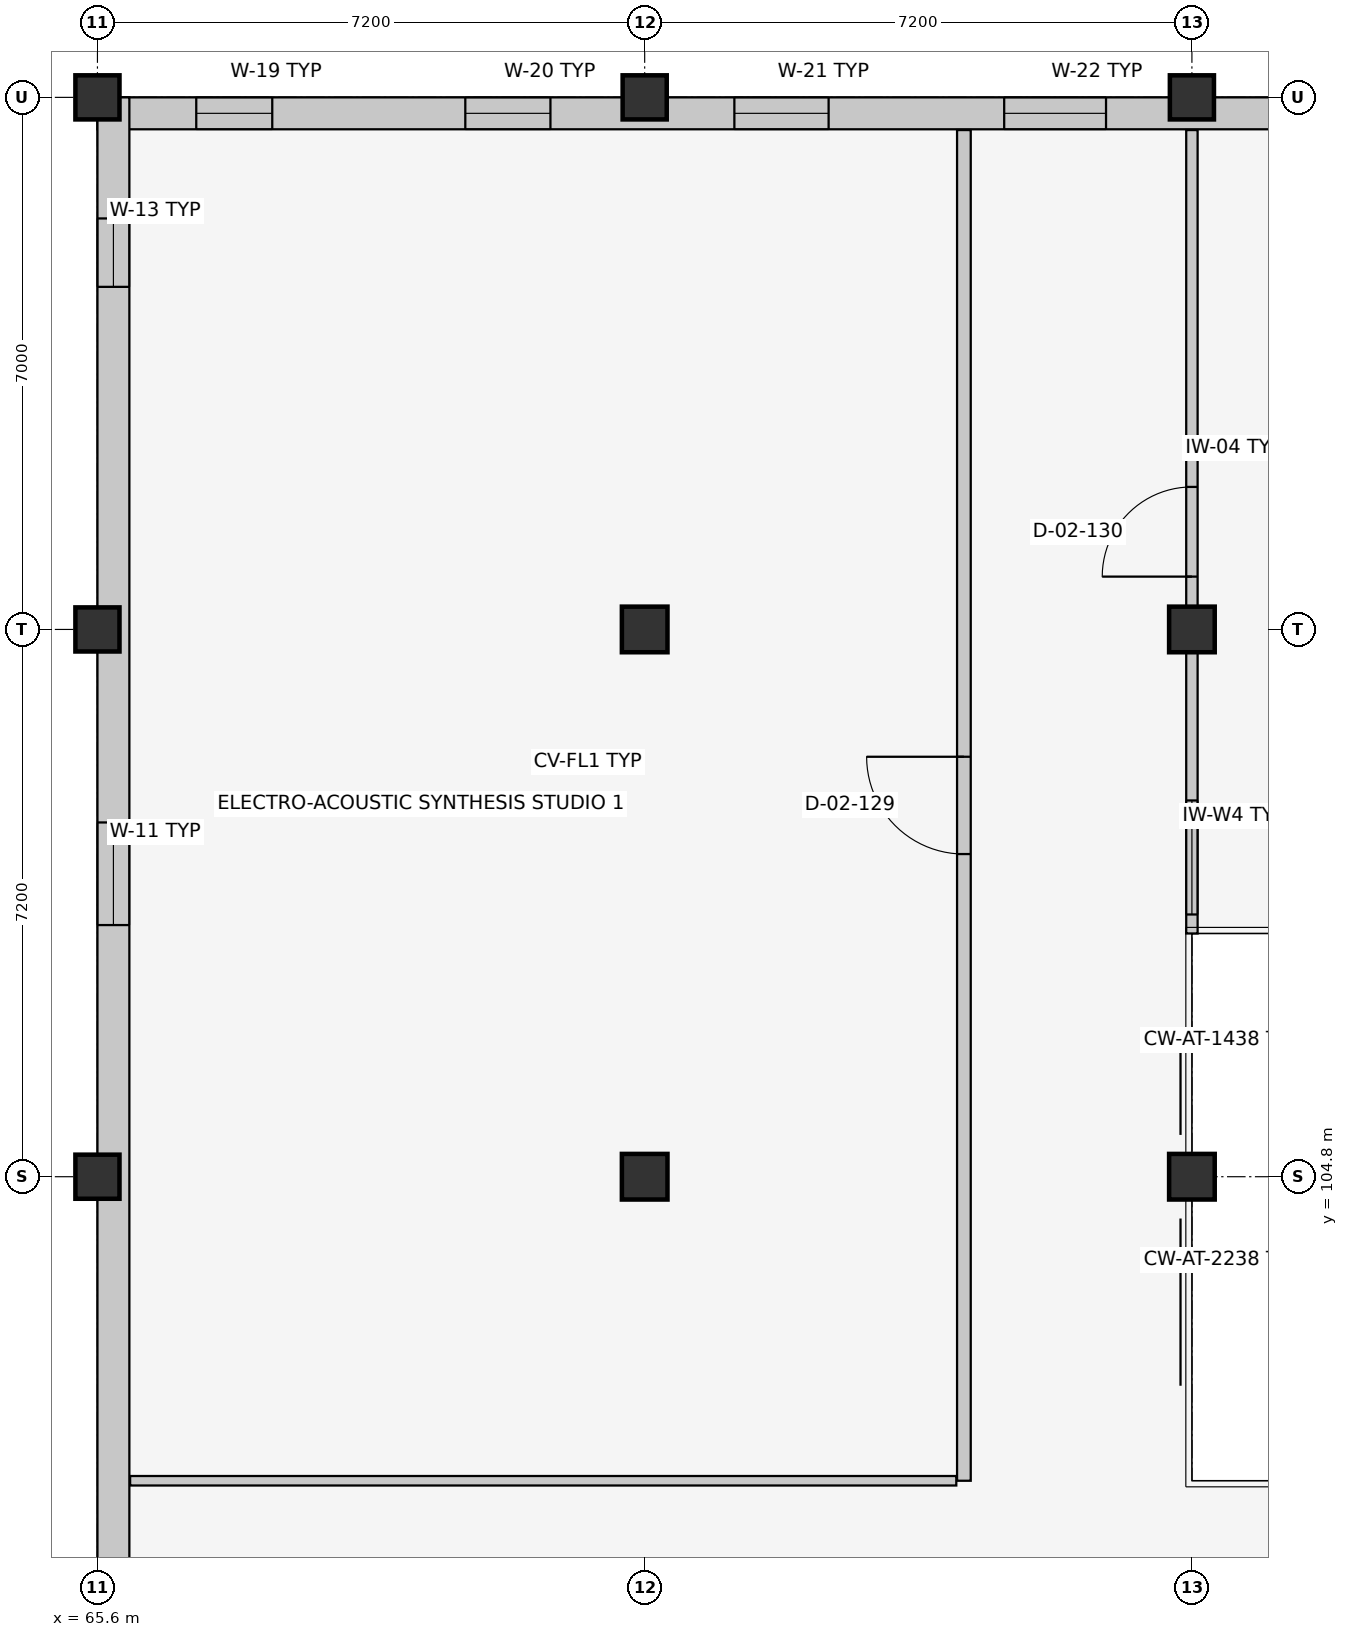
"""IFC4 building model, lengths in metres.
Left out: names, types, materials, properties, quantities, classifications, styles, units other than length and angle.
Written with IfcOpenShell. Run it as: python <this file> out.ifc"""

import sys

from ifc_helpers import new_model, si_unit, direction, frame, frame_2d, origin, origin_2d, place, context, subcontext, project, spatial, rectangle, extrude, element, fill, save


model = new_model("IFC4")
c1 = context("Model", 3, precision=1e-05, world=origin(), true_north=direction((0.0, 1.0)))
c2 = subcontext(c1, "Body", "Model", "MODEL_VIEW")
j1 = project(units=[si_unit("LENGTHUNIT", "METRE"), si_unit("PLANEANGLEUNIT", "RADIAN")], contexts=[c1])
p1 = place(None, origin())
s1 = spatial("IfcSite", under=j1, at=p1, CompositionType="ELEMENT")
p2 = place(p1, origin())
s2 = spatial("IfcBuilding", under=s1, at=p2, CompositionType="ELEMENT")
p3 = place(p2, frame((0.0, 0.0, 9.6)))
s3 = spatial("IfcBuildingStorey", under=s2, at=p3, CompositionType="ELEMENT", Elevation=9.6)
for number, where, z_axis, x_axis in (
    (1, (65.6, 104.8, 0.0), (0.0, 0.0, 1.0), (1.0, 0.0, 0.0)),
    (2, (65.6, 112.0, 0.0), (0.0, 0.0, 1.0), (1.0, 0.0, 0.0)),
    (3, (65.6, 119.0, 0.0), (0.0, 0.0, 1.0), (1.0, 0.0, 0.0)),
):
    element("IfcColumn", number, at=place(p3, frame(where, z_axis=z_axis, x_axis=x_axis)), inside=s3, PredefinedType="COLUMN", context=c2, shape_type="SweptSolid", body=[
        extrude(rectangle(XDim=0.58, YDim=0.58, at=origin_2d()), origin(), (0.0, 0.0, 1.0), 4.2),
    ])
for number, where, z_axis, x_axis in (
    (4, (72.8, 104.8, 0.0), (0.0, 0.0, 1.0), (1.0, 0.0, 0.0)),
    (5, (72.8, 112.0, 0.0), (0.0, 0.0, 1.0), (1.0, 0.0, 0.0)),
):
    element("IfcColumn", number, at=place(p3, frame(where, z_axis=z_axis, x_axis=x_axis)), inside=s3, PredefinedType="COLUMN", context=c2, shape_type="SweptSolid", body=[
        extrude(rectangle(XDim=0.6, YDim=0.6, at=origin_2d()), origin(), (0.0, 0.0, 1.0), 4.2),
    ])
p4 = place(p3, frame((72.8, 119.0, 0.0), z_axis=(0.0, 0.0, 1.0), x_axis=(1.0, 0.0, 0.0)))
e6 = element("IfcColumn", 6, at=p4, inside=s3, PredefinedType="COLUMN", context=c2, shape_type="SweptSolid", body=[
    extrude(rectangle(XDim=0.58, YDim=0.58, at=origin_2d()), origin(), (0.0, 0.0, 1.0), 4.2),
])
for number, where, z_axis, x_axis in (
    (7, (80.0, 104.8, 0.0), (0.0, 0.0, 1.0), (1.0, 0.0, 0.0)),
    (8, (80.0, 112.0, 0.0), (0.0, 0.0, 1.0), (1.0, 0.0, 0.0)),
):
    element("IfcColumn", number, at=place(p3, frame(where, z_axis=z_axis, x_axis=x_axis)), inside=s3, PredefinedType="COLUMN", context=c2, shape_type="SweptSolid", body=[
        extrude(rectangle(XDim=0.6, YDim=0.6, at=origin_2d()), origin(), (0.0, 0.0, 1.0), 4.2),
    ])
p5 = place(p3, frame((80.0, 119.0, 0.0), z_axis=(0.0, 0.0, 1.0), x_axis=(1.0, 0.0, 0.0)))
e9 = element("IfcColumn", 9, at=p5, inside=s3, PredefinedType="COLUMN", context=c2, shape_type="SweptSolid", body=[
    extrude(rectangle(XDim=0.58, YDim=0.58, at=origin_2d()), origin(), (0.0, 0.0, 1.0), 4.2),
])
p6 = place(p3, frame((65.6, 118.79, 0.0), z_axis=(0.0, 0.0, 1.0), x_axis=(1.0, 0.0, 0.0)))
e10 = element("IfcWall", 10, at=p6, inside=s3, PredefinedType="SOLIDWALL", context=c2, shape_type="SweptSolid", body=[
    extrude(rectangle(XDim=43.2, YDim=0.42, at=frame_2d((21.6, 0.0))), origin(), (0.0, 0.0, 1.0), 3.245),
])
p7 = place(p6, frame((1.3, 0.0, 0.9)))
e11 = element("IfcOpeningElement", 11, at=p7, cuts=e10, PredefinedType="OPENING", context=c2, shape_type="SweptSolid", body=[
    extrude(rectangle(XDim=1.0, YDim=1.75, at=frame_2d((0.5, 0.875))), frame((0.0, 0.222, 0.0), z_axis=(0.0, -1.0, 0.0), x_axis=(1.0, 0.0, 0.0)), (0.0, 0.0, 1.0), 0.444),
])
p8 = place(p6, frame((4.84, 0.0, 0.9)))
e12 = element("IfcOpeningElement", 12, at=p8, cuts=e10, PredefinedType="OPENING", context=c2, shape_type="SweptSolid", body=[
    extrude(rectangle(XDim=1.12, YDim=1.75, at=frame_2d((0.56, 0.875))), frame((0.0, 0.222, 0.0), z_axis=(0.0, -1.0, 0.0), x_axis=(1.0, 0.0, 0.0)), (0.0, 0.0, 1.0), 0.444),
])
p9 = place(p6, frame((8.38, 0.0, 0.9)))
e13 = element("IfcOpeningElement", 13, at=p9, cuts=e10, PredefinedType="OPENING", context=c2, shape_type="SweptSolid", body=[
    extrude(rectangle(XDim=1.24, YDim=1.75, at=frame_2d((0.62, 0.875))), frame((0.0, 0.222, 0.0), z_axis=(0.0, -1.0, 0.0), x_axis=(1.0, 0.0, 0.0)), (0.0, 0.0, 1.0), 0.444),
])
p10 = place(p6, frame((11.93, 0.0, 0.9)))
e14 = element("IfcOpeningElement", 14, at=p10, cuts=e10, PredefinedType="OPENING", context=c2, shape_type="SweptSolid", body=[
    extrude(rectangle(XDim=1.34, YDim=1.75, at=frame_2d((0.67, 0.875))), frame((0.0, 0.222, 0.0), z_axis=(0.0, -1.0, 0.0), x_axis=(1.0, 0.0, 0.0)), (0.0, 0.0, 1.0), 0.444),
])
p11 = place(p6, frame((15.48, 0.0, 0.9)))
e15 = element("IfcOpeningElement", 15, at=p11, cuts=e10, PredefinedType="OPENING", context=c2, shape_type="SweptSolid", body=[
    extrude(rectangle(XDim=1.44, YDim=1.75, at=frame_2d((0.72, 0.875))), frame((0.0, 0.222, 0.0), z_axis=(0.0, -1.0, 0.0), x_axis=(1.0, 0.0, 0.0)), (0.0, 0.0, 1.0), 0.444),
])
p12 = place(p6, frame((19.05, 0.0, 0.9)))
e16 = element("IfcOpeningElement", 16, at=p12, cuts=e10, PredefinedType="OPENING", context=c2, shape_type="SweptSolid", body=[
    extrude(rectangle(XDim=1.5, YDim=1.75, at=frame_2d((0.75, 0.875))), frame((0.0, 0.222, 0.0), z_axis=(0.0, -1.0, 0.0), x_axis=(1.0, 0.0, 0.0)), (0.0, 0.0, 1.0), 0.444),
])
p13 = place(p6, frame((22.95, 0.0, 0.9)))
e17 = element("IfcOpeningElement", 17, at=p13, cuts=e10, PredefinedType="OPENING", context=c2, shape_type="SweptSolid", body=[
    extrude(rectangle(XDim=0.9, YDim=1.35, at=frame_2d((0.45, 0.675))), frame((0.0, 0.222, 0.0), z_axis=(0.0, -1.0, 0.0), x_axis=(1.0, 0.0, 0.0)), (0.0, 0.0, 1.0), 0.444),
])
p14 = place(p6, frame((26.5, 0.0, 0.9)))
e18 = element("IfcOpeningElement", 18, at=p14, cuts=e10, PredefinedType="OPENING", context=c2, shape_type="SweptSolid", body=[
    extrude(rectangle(XDim=1.0, YDim=1.35, at=frame_2d((0.5, 0.675))), frame((0.0, 0.222, 0.0), z_axis=(0.0, -1.0, 0.0), x_axis=(1.0, 0.0, 0.0)), (0.0, 0.0, 1.0), 0.444),
])
p15 = place(p6, frame((30.05, 0.0, 0.9)))
e19 = element("IfcOpeningElement", 19, at=p15, cuts=e10, PredefinedType="OPENING", context=c2, shape_type="SweptSolid", body=[
    extrude(rectangle(XDim=1.1, YDim=1.35, at=frame_2d((0.55, 0.675))), frame((0.0, 0.222, 0.0), z_axis=(0.0, -1.0, 0.0), x_axis=(1.0, 0.0, 0.0)), (0.0, 0.0, 1.0), 0.444),
])
p16 = place(p6, frame((33.6, 0.0, 0.9)))
e20 = element("IfcOpeningElement", 20, at=p16, cuts=e10, PredefinedType="OPENING", context=c2, shape_type="SweptSolid", body=[
    extrude(rectangle(XDim=1.2, YDim=1.35, at=frame_2d((0.6, 0.675))), frame((0.0, 0.222, 0.0), z_axis=(0.0, -1.0, 0.0), x_axis=(1.0, 0.0, 0.0)), (0.0, 0.0, 1.0), 0.444),
])
p17 = place(p6, frame((37.15, 0.0, 0.9)))
e21 = element("IfcOpeningElement", 21, at=p17, cuts=e10, PredefinedType="OPENING", context=c2, shape_type="SweptSolid", body=[
    extrude(rectangle(XDim=1.3, YDim=1.35, at=frame_2d((0.65, 0.675))), frame((0.0, 0.222, 0.0), z_axis=(0.0, -1.0, 0.0), x_axis=(1.0, 0.0, 0.0)), (0.0, 0.0, 1.0), 0.444),
])
p18 = place(p6, frame((40.7, 0.0, 0.9)))
e22 = element("IfcOpeningElement", 22, at=p18, cuts=e10, PredefinedType="OPENING", context=c2, shape_type="SweptSolid", body=[
    extrude(rectangle(XDim=1.4, YDim=1.35, at=frame_2d((0.7, 0.675))), frame((0.0, 0.222, 0.0), z_axis=(0.0, -1.0, 0.0), x_axis=(1.0, 0.0, 0.0)), (0.0, 0.0, 1.0), 0.444),
])
p19 = place(p3, frame((65.81, 90.4, 0.0), z_axis=(0.0, 0.0, 1.0), x_axis=(0.0, 1.0, 0.0)))
e23 = element("IfcWall", 23, at=p19, inside=s3, PredefinedType="SOLIDWALL", context=c2, shape_type="SweptSolid", body=[
    extrude(rectangle(XDim=28.6, YDim=0.42, at=frame_2d((14.3, 0.0))), origin(), (0.0, 0.0, 1.0), 3.315),
])
p20 = place(p19, frame((1.568, 0.0, 0.9)))
e24 = element("IfcOpeningElement", 24, at=p20, cuts=e23, PredefinedType="OPENING", context=c2, shape_type="SweptSolid", body=[
    extrude(rectangle(XDim=0.95, YDim=1.45, at=frame_2d((0.475, 0.725))), frame((0.0, 0.222, 0.0), z_axis=(0.0, -1.0, 0.0), x_axis=(1.0, 0.0, 0.0)), (0.0, 0.0, 1.0), 0.444),
])
p21 = place(p19, frame((17.711, 0.0, 0.9)))
e25 = element("IfcOpeningElement", 25, at=p21, cuts=e23, PredefinedType="OPENING", context=c2, shape_type="SweptSolid", body=[
    extrude(rectangle(XDim=1.35, YDim=1.45, at=frame_2d((0.675, 0.725))), frame((0.0, 0.222, 0.0), z_axis=(0.0, -1.0, 0.0), x_axis=(1.0, 0.0, 0.0)), (0.0, 0.0, 1.0), 0.444),
])
p22 = place(p19, frame((26.107, 0.0, 0.9)))
e26 = element("IfcOpeningElement", 26, at=p22, cuts=e23, PredefinedType="OPENING", context=c2, shape_type="SweptSolid", body=[
    extrude(rectangle(XDim=0.9, YDim=1.6, at=frame_2d((0.45, 0.8))), frame((0.0, 0.222, 0.0), z_axis=(0.0, -1.0, 0.0), x_axis=(1.0, 0.0, 0.0)), (0.0, 0.0, 1.0), 0.444),
])
p23 = place(p3, frame((77.0, 100.8, 0.0), z_axis=(0.0, 0.0, 1.0), x_axis=(0.0, 1.0, 0.0)))
e27 = element("IfcWall", 27, at=p23, inside=s3, PredefinedType="PARTITIONING", context=c2, shape_type="SweptSolid", body=[
    extrude(rectangle(XDim=17.77, YDim=0.18, at=frame_2d((8.885, 0.0))), origin(), (0.0, 0.0, 1.0), 3.92),
])
p24 = place(p23, frame((8.245, 0.0, 0.0)))
e28 = element("IfcOpeningElement", 28, at=p24, cuts=e27, PredefinedType="OPENING", context=c2, shape_type="SweptSolid", body=[
    extrude(rectangle(XDim=1.28, YDim=2.2, at=frame_2d((0.64, 1.1))), frame((0.0, 0.102, 0.0), z_axis=(0.0, -1.0, 0.0), x_axis=(1.0, 0.0, 0.0)), (0.0, 0.0, 1.0), 0.204),
])
p25 = place(p3, frame((66.03, 100.8, 0.0), z_axis=(0.0, 0.0, 1.0), x_axis=(1.0, 0.0, 0.0)))
e29 = element("IfcWall", 29, at=p25, inside=s3, PredefinedType="PARTITIONING", context=c2, shape_type="SweptSolid", body=[
    extrude(rectangle(XDim=10.87, YDim=0.125, at=frame_2d((5.435, 0.0))), origin(), (0.0, 0.0, 1.0), 3.92),
])
p26 = place(p3, frame((80.0, 108.0, 0.0), z_axis=(0.0, 0.0, 1.0), x_axis=(0.0, 1.0, 0.0)))
e30 = element("IfcWall", 30, at=p26, inside=s3, PredefinedType="PARTITIONING", context=c2, shape_type="SweptSolid", body=[
    extrude(rectangle(XDim=10.57, YDim=0.15, at=frame_2d((5.285, 0.0))), origin(), (0.0, 0.0, 1.0), 3.295),
])
p27 = place(p26, frame((4.695, 0.0, 0.0)))
e31 = element("IfcOpeningElement", 31, at=p27, cuts=e30, PredefinedType="OPENING", context=c2, shape_type="SweptSolid", body=[
    extrude(rectangle(XDim=1.18, YDim=2.2, at=frame_2d((0.59, 1.1))), frame((0.0, 0.087, 0.0), z_axis=(0.0, -1.0, 0.0), x_axis=(1.0, 0.0, 0.0)), (0.0, 0.0, 1.0), 0.174),
])
p28 = place(p26, frame((0.25, 0.0, 1.0)))
e32 = element("IfcOpeningElement", 32, at=p28, cuts=e30, PredefinedType="OPENING", context=c2, shape_type="SweptSolid", body=[
    extrude(rectangle(XDim=1.5, YDim=1.2, at=frame_2d((0.75, 0.6))), frame((0.0, 0.087, 0.0), z_axis=(0.0, -1.0, 0.0), x_axis=(1.0, 0.0, 0.0)), (0.0, 0.0, 1.0), 0.174),
])
p29 = place(p7, origin())
e33 = element("IfcWindow", 33, at=p29, inside=s3, PartitioningType="SINGLE_PANEL", PredefinedType="WINDOW", context=c2, shape_type="SweptSolid", body=[
    extrude(rectangle(XDim=1.0, YDim=1.75, at=frame_2d((0.5, 0.875))), frame((0.0, 0.03, 0.0), z_axis=(0.0, -1.0, 0.0), x_axis=(1.0, 0.0, 0.0)), (0.0, 0.0, 1.0), 0.06),
])
fill(e11, e33)
p30 = place(p8, origin())
e34 = element("IfcWindow", 34, at=p30, inside=s3, PartitioningType="SINGLE_PANEL", PredefinedType="WINDOW", context=c2, shape_type="SweptSolid", body=[
    extrude(rectangle(XDim=1.12, YDim=1.75, at=frame_2d((0.56, 0.875))), frame((0.0, 0.03, 0.0), z_axis=(0.0, -1.0, 0.0), x_axis=(1.0, 0.0, 0.0)), (0.0, 0.0, 1.0), 0.06),
])
fill(e12, e34)
p31 = place(p9, origin())
e35 = element("IfcWindow", 35, at=p31, inside=s3, PartitioningType="SINGLE_PANEL", PredefinedType="WINDOW", context=c2, shape_type="SweptSolid", body=[
    extrude(rectangle(XDim=1.24, YDim=1.75, at=frame_2d((0.62, 0.875))), frame((0.0, 0.03, 0.0), z_axis=(0.0, -1.0, 0.0), x_axis=(1.0, 0.0, 0.0)), (0.0, 0.0, 1.0), 0.06),
])
fill(e13, e35)
p32 = place(p10, origin())
e36 = element("IfcWindow", 36, at=p32, inside=s3, PartitioningType="SINGLE_PANEL", PredefinedType="WINDOW", context=c2, shape_type="SweptSolid", body=[
    extrude(rectangle(XDim=1.34, YDim=1.75, at=frame_2d((0.67, 0.875))), frame((0.0, 0.03, 0.0), z_axis=(0.0, -1.0, 0.0), x_axis=(1.0, 0.0, 0.0)), (0.0, 0.0, 1.0), 0.06),
])
fill(e14, e36)
p33 = place(p21, origin())
e37 = element("IfcWindow", 37, at=p33, inside=s3, PartitioningType="SINGLE_PANEL", PredefinedType="WINDOW", context=c2, shape_type="SweptSolid", body=[
    extrude(rectangle(XDim=1.35, YDim=1.45, at=frame_2d((0.675, 0.725))), frame((0.0, 0.03, 0.0), z_axis=(0.0, -1.0, 0.0), x_axis=(1.0, 0.0, 0.0)), (0.0, 0.0, 1.0), 0.06),
])
fill(e25, e37)
p34 = place(p22, origin())
e38 = element("IfcWindow", 38, at=p34, inside=s3, PartitioningType="SINGLE_PANEL", PredefinedType="WINDOW", context=c2, shape_type="SweptSolid", body=[
    extrude(rectangle(XDim=0.9, YDim=1.6, at=frame_2d((0.45, 0.8))), frame((0.0, 0.03, 0.0), z_axis=(0.0, -1.0, 0.0), x_axis=(1.0, 0.0, 0.0)), (0.0, 0.0, 1.0), 0.06),
])
fill(e26, e38)
p35 = place(p24, origin())
e39 = element("IfcDoor", 39, at=p35, inside=s3, OperationType="SINGLE_SWING_RIGHT", PredefinedType="DOOR", context=c2, shape_type="SweptSolid", body=[
    extrude(rectangle(XDim=1.28, YDim=2.2, at=frame_2d((0.64, 1.1))), frame((0.0, 0.025, 0.0), z_axis=(0.0, -1.0, 0.0), x_axis=(1.0, 0.0, 0.0)), (0.0, 0.0, 1.0), 0.05),
])
fill(e28, e39)
p36 = place(p27, origin())
e40 = element("IfcDoor", 40, at=p36, inside=s3, OperationType="SINGLE_SWING_LEFT", PredefinedType="DOOR", context=c2, shape_type="SweptSolid", body=[
    extrude(rectangle(XDim=1.18, YDim=2.2, at=frame_2d((0.59, 1.1))), frame((0.0, 0.025, 0.0), z_axis=(0.0, -1.0, 0.0), x_axis=(1.0, 0.0, 0.0)), (0.0, 0.0, 1.0), 0.05),
])
fill(e31, e40)
p37 = place(p28, origin())
e41 = element("IfcWindow", 41, at=p37, inside=s3, PartitioningType="SINGLE_PANEL", PredefinedType="WINDOW", context=c2, shape_type="SweptSolid", body=[
    extrude(rectangle(XDim=1.5, YDim=1.2, at=frame_2d((0.75, 0.6))), frame((0.0, 0.03, 0.0), z_axis=(0.0, -1.0, 0.0), x_axis=(1.0, 0.0, 0.0)), (0.0, 0.0, 1.0), 0.06),
])
fill(e32, e41)
save(model, sys.argv[1])
